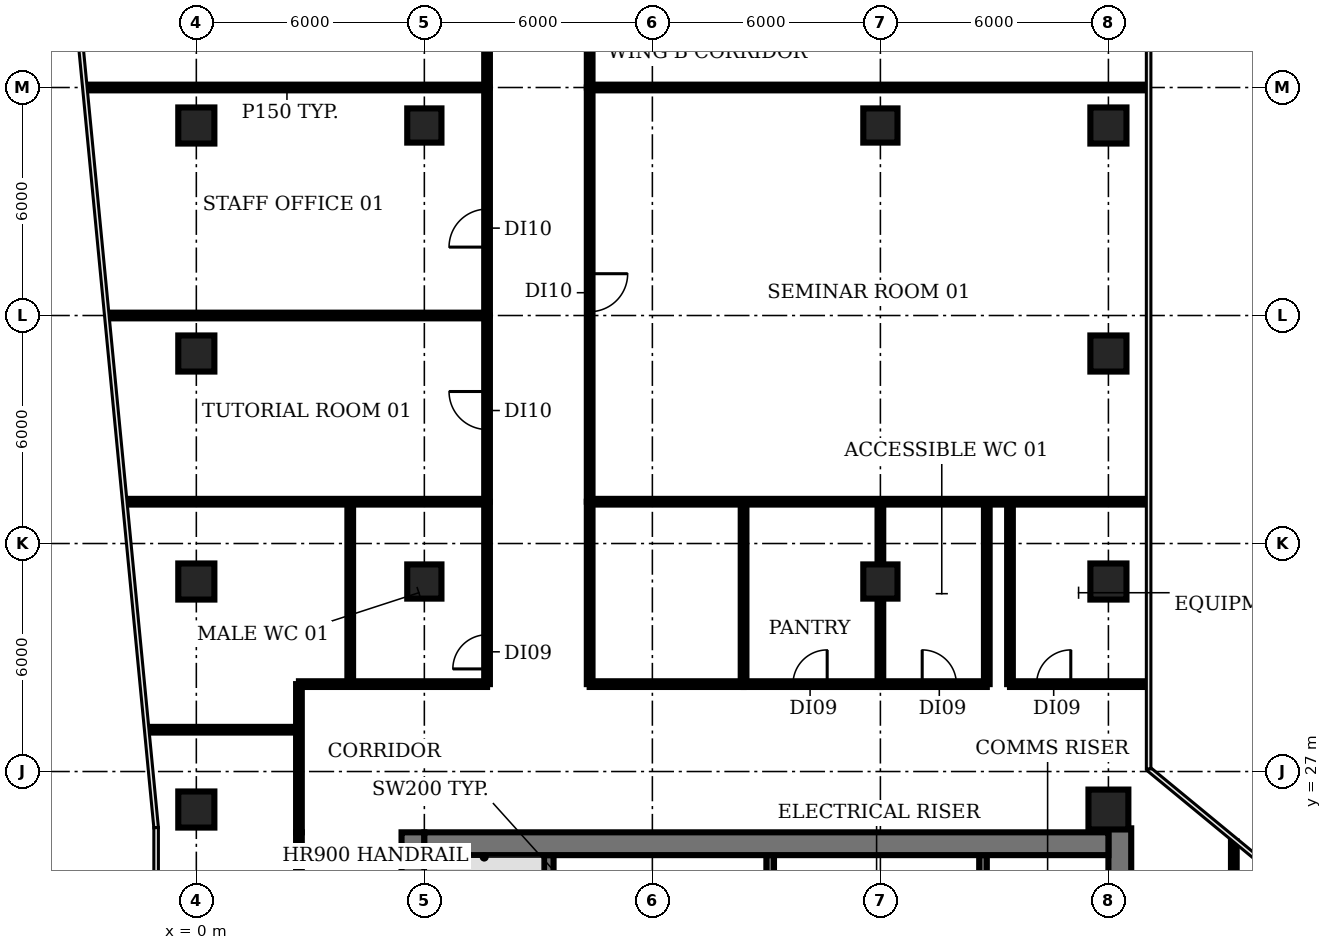
"""IFC4 building model, lengths in metres.
Left out: names, types, materials, properties, quantities, classifications, styles, units other than length and angle.
Written with IfcOpenShell. Run it as: python <this file> out.ifc"""

import sys

from ifc_helpers import new_model, si_unit, direction, frame, frame_2d, origin, origin_2d, place, context, subcontext, project, spatial, rectangle, circle, extrude, element, fill, save


model = new_model("IFC4")
c1 = context("Model", 3, precision=1e-05, world=origin(), true_north=direction((0.0, 1.0)))
c2 = subcontext(c1, "Body", "Model", "MODEL_VIEW")
j1 = project(units=[si_unit("LENGTHUNIT", "METRE"), si_unit("PLANEANGLEUNIT", "RADIAN")], contexts=[c1])
p1 = place(None, origin())
s1 = spatial("IfcSite", under=j1, at=p1, CompositionType="ELEMENT")
p2 = place(p1, origin())
s2 = spatial("IfcBuilding", under=s1, at=p2, CompositionType="ELEMENT")
p3 = place(p2, frame((0.0, 0.0, 192.8)))
s3 = spatial("IfcBuildingStorey", under=s2, at=p3, CompositionType="ELEMENT", Elevation=192.8)
for number, where, z_axis, x_axis in (
    (1, (0.0, 26.0, 0.0), (0.0, 0.0, 1.0), (1.0, 0.0, 0.0)),
    (2, (0.0, 32.0, 0.0), (0.0, 0.0, 1.0), (1.0, 0.0, 0.0)),
    (3, (0.0, 38.0, 0.0), (0.0, 0.0, 1.0), (1.0, 0.0, 0.0)),
    (4, (0.0, 44.0, 0.0), (0.0, 0.0, 1.0), (1.0, 0.0, 0.0)),
):
    element("IfcColumn", number, at=place(p3, frame(where, z_axis=z_axis, x_axis=x_axis)), inside=s3, PredefinedType="COLUMN", context=c2, shape_type="SweptSolid", body=[
        extrude(rectangle(XDim=0.95, YDim=0.95, at=origin_2d()), origin(), (0.0, 0.0, 1.0), 3.2),
    ])
for number, where, z_axis, x_axis in (
    (5, (6.0, 32.0, 0.0), (0.0, 0.0, 1.0), (1.0, 0.0, 0.0)),
    (6, (6.0, 44.0, 0.0), (0.0, 0.0, 1.0), (1.0, 0.0, 0.0)),
    (7, (18.0, 32.0, 0.0), (0.0, 0.0, 1.0), (1.0, 0.0, 0.0)),
    (8, (18.0, 44.0, 0.0), (0.0, 0.0, 1.0), (1.0, 0.0, 0.0)),
):
    element("IfcColumn", number, at=place(p3, frame(where, z_axis=z_axis, x_axis=x_axis)), inside=s3, PredefinedType="COLUMN", context=c2, shape_type="SweptSolid", body=[
        extrude(rectangle(XDim=0.9, YDim=0.9, at=origin_2d()), origin(), (0.0, 0.0, 1.0), 3.2),
    ])
p4 = place(p3, frame((24.0, 26.0, 0.0), z_axis=(0.0, 0.0, 1.0), x_axis=(1.0, 0.0, 0.0)))
e9 = element("IfcColumn", 9, at=p4, inside=s3, PredefinedType="COLUMN", context=c2, shape_type="SweptSolid", body=[
    extrude(circle(Radius=0.525, at=origin_2d()), origin(), (0.0, 0.0, 1.0), 3.2),
])
for number, where, z_axis, x_axis in (
    (10, (24.0, 32.0, 0.0), (0.0, 0.0, 1.0), (1.0, 0.0, 0.0)),
    (11, (24.0, 38.0, 0.0), (0.0, 0.0, 1.0), (1.0, 0.0, 0.0)),
    (12, (24.0, 44.0, 0.0), (0.0, 0.0, 1.0), (1.0, 0.0, 0.0)),
):
    element("IfcColumn", number, at=place(p3, frame(where, z_axis=z_axis, x_axis=x_axis)), inside=s3, PredefinedType="COLUMN", context=c2, shape_type="SweptSolid", body=[
        extrude(rectangle(XDim=0.95, YDim=0.95, at=origin_2d()), origin(), (0.0, 0.0, 1.0), 3.2),
    ])
p5 = place(p3, frame((9.275, 18.375, 0.0), z_axis=(0.0, 0.0, 1.0), x_axis=(0.0, 1.0, 0.0)))
e13 = element("IfcWall", 13, at=p5, inside=s3, PredefinedType="SHEAR", context=c2, shape_type="SweptSolid", body=[
    extrude(rectangle(XDim=6.425, YDim=0.25, at=frame_2d((3.212, 0.0))), origin(), (0.0, 0.0, 1.0), 3.8),
])
for number, where, z_axis, x_axis in (
    (14, (15.1, 22.9, 0.0), (0.0, 0.0, 1.0), (0.0, 1.0, 0.0)),
    (15, (20.7, 22.9, 0.0), (0.0, 0.0, 1.0), (0.0, 1.0, 0.0)),
):
    element("IfcWall", number, at=place(p3, frame(where, z_axis=z_axis, x_axis=x_axis)), inside=s3, PredefinedType="SHEAR", context=c2, shape_type="SweptSolid", body=[
        extrude(rectangle(XDim=1.9, YDim=0.2, at=frame_2d((0.95, 0.0))), origin(), (0.0, 0.0, 1.0), 3.8),
    ])
p6 = place(p3, frame((5.7, 4.8, 0.0), z_axis=(0.0, 0.0, 1.0), x_axis=(0.0, 1.0, 0.0)))
e16 = element("IfcWall", 16, at=p6, inside=s3, PredefinedType="SHEAR", context=c2, shape_type="SweptSolid", body=[
    extrude(rectangle(XDim=20.6, YDim=0.6, at=frame_2d((10.3, 0.0))), origin(), (0.0, 0.0, 1.0), 3.8),
])
p7 = place(p6, frame((0.85, 0.0, 0.0)))
e17 = element("IfcOpeningElement", 17, at=p7, cuts=e16, PredefinedType="OPENING", context=c2, shape_type="SweptSolid", body=[
    extrude(rectangle(XDim=1.5, YDim=2.1, at=frame_2d((0.75, 1.05))), frame((0.0, 0.31, 0.0), z_axis=(0.0, -1.0, 0.0), x_axis=(1.0, 0.0, 0.0)), (0.0, 0.0, 1.0), 0.62),
])
p8 = place(p6, frame((7.3, 0.0, 0.0)))
e18 = element("IfcOpeningElement", 18, at=p8, cuts=e16, PredefinedType="OPENING", context=c2, shape_type="SweptSolid", body=[
    extrude(rectangle(XDim=1.2, YDim=2.1, at=frame_2d((0.6, 1.05))), frame((0.0, 0.31, 0.0), z_axis=(0.0, -1.0, 0.0), x_axis=(1.0, 0.0, 0.0)), (0.0, 0.0, 1.0), 0.62),
])
p9 = place(p6, frame((13.85, 0.0, 0.0)))
e19 = element("IfcOpeningElement", 19, at=p9, cuts=e16, PredefinedType="OPENING", context=c2, shape_type="SweptSolid", body=[
    extrude(rectangle(XDim=1.2, YDim=2.1, at=frame_2d((0.6, 1.05))), frame((0.0, 0.31, 0.0), z_axis=(0.0, -1.0, 0.0), x_axis=(1.0, 0.0, 0.0)), (0.0, 0.0, 1.0), 0.62),
])
p10 = place(p3, frame((24.3, 25.505, 0.0), z_axis=(0.0, 0.0, 1.0), x_axis=(0.0, -1.0, 0.0)))
e20 = element("IfcWall", 20, at=p10, inside=s3, PredefinedType="SHEAR", context=c2, shape_type="SweptSolid", body=[
    extrude(rectangle(XDim=20.705, YDim=0.6, at=frame_2d((10.353, 0.0))), origin(), (0.0, 0.0, 1.0), 3.8),
])
p11 = place(p10, frame((18.355, 0.0, 0.0)))
e21 = element("IfcOpeningElement", 21, at=p11, cuts=e20, PredefinedType="OPENING", context=c2, shape_type="SweptSolid", body=[
    extrude(rectangle(XDim=1.5, YDim=2.1, at=frame_2d((0.75, 1.05))), frame((0.0, 0.31, 0.0), z_axis=(0.0, -1.0, 0.0), x_axis=(1.0, 0.0, 0.0)), (0.0, 0.0, 1.0), 0.62),
])
p12 = place(p10, frame((12.255, 0.0, 0.0)))
e22 = element("IfcOpeningElement", 22, at=p12, cuts=e20, PredefinedType="OPENING", context=c2, shape_type="SweptSolid", body=[
    extrude(rectangle(XDim=0.9, YDim=2.1, at=frame_2d((0.45, 1.05))), frame((0.0, 0.31, 0.0), z_axis=(0.0, -1.0, 0.0), x_axis=(1.0, 0.0, 0.0)), (0.0, 0.0, 1.0), 0.62),
])
p13 = place(p10, frame((6.255, 0.0, 0.0)))
e23 = element("IfcOpeningElement", 23, at=p13, cuts=e20, PredefinedType="OPENING", context=c2, shape_type="SweptSolid", body=[
    extrude(rectangle(XDim=2.0, YDim=2.1, at=frame_2d((1.0, 1.05))), frame((0.0, 0.31, 0.0), z_axis=(0.0, -1.0, 0.0), x_axis=(1.0, 0.0, 0.0)), (0.0, 0.0, 1.0), 0.62),
])
p14 = place(p3, frame((6.0, 25.1, 0.0), z_axis=(0.0, 0.0, 1.0), x_axis=(1.0, 0.0, 0.0)))
e24 = element("IfcWall", 24, at=p14, inside=s3, PredefinedType="SHEAR", context=c2, shape_type="SweptSolid", body=[
    extrude(rectangle(XDim=18.0, YDim=0.6, at=frame_2d((9.0, 0.0))), origin(), (0.0, 0.0, 1.0), 3.8),
])
p15 = place(p3, frame((-2.88, 45.0, 0.0), z_axis=(0.0, 0.0, 1.0), x_axis=(1.0, 0.0, 0.0)))
e25 = element("IfcWall", 25, at=p15, inside=s3, PredefinedType="PARTITIONING", context=c2, shape_type="SweptSolid", body=[
    extrude(rectangle(XDim=10.53, YDim=0.15, at=frame_2d((5.265, 0.0))), origin(), (0.0, 0.0, 1.0), 2.83),
])
p16 = place(p3, frame((-2.31, 39.0, 0.0), z_axis=(0.0, 0.0, 1.0), x_axis=(1.0, 0.0, 0.0)))
e26 = element("IfcWall", 26, at=p16, inside=s3, PredefinedType="PARTITIONING", context=c2, shape_type="SweptSolid", body=[
    extrude(rectangle(XDim=9.96, YDim=0.15, at=frame_2d((4.98, 0.0))), origin(), (0.0, 0.0, 1.0), 2.83),
])
p17 = place(p3, frame((-1.83, 34.1, 0.0), z_axis=(0.0, 0.0, 1.0), x_axis=(1.0, 0.0, 0.0)))
e27 = element("IfcWall", 27, at=p17, inside=s3, PredefinedType="PARTITIONING", context=c2, shape_type="SweptSolid", body=[
    extrude(rectangle(XDim=9.48, YDim=0.15, at=frame_2d((4.74, 0.0))), origin(), (0.0, 0.0, 1.0), 2.83),
])
p18 = place(p3, frame((-1.26, 28.1, 0.0), z_axis=(0.0, 0.0, 1.0), x_axis=(1.0, 0.0, 0.0)))
e28 = element("IfcWall", 28, at=p18, inside=s3, PredefinedType="PARTITIONING", context=c2, shape_type="SweptSolid", body=[
    extrude(rectangle(XDim=3.96, YDim=0.15, at=frame_2d((1.98, 0.0))), origin(), (0.0, 0.0, 1.0), 2.83),
])
p19 = place(p3, frame((2.7, 4.8, 0.0), z_axis=(0.0, 0.0, 1.0), x_axis=(0.0, 1.0, 0.0)))
e29 = element("IfcWall", 29, at=p19, inside=s3, PredefinedType="PARTITIONING", context=c2, shape_type="SweptSolid", body=[
    extrude(rectangle(XDim=20.6, YDim=0.15, at=frame_2d((10.3, 0.0))), origin(), (0.0, 0.0, 1.0), 2.83),
])
p20 = place(p19, frame((10.2, 0.0, 0.0)))
e30 = element("IfcOpeningElement", 30, at=p20, cuts=e29, PredefinedType="OPENING", context=c2, shape_type="SweptSolid", body=[
    extrude(rectangle(XDim=1.2, YDim=2.1, at=frame_2d((0.6, 1.05))), frame((0.0, 0.085, 0.0), z_axis=(0.0, -1.0, 0.0), x_axis=(1.0, 0.0, 0.0)), (0.0, 0.0, 1.0), 0.17),
])
p21 = place(p3, frame((2.7, 25.4, 0.0), z_axis=(0.0, 0.0, 1.0), x_axis=(0.0, 1.0, 0.0)))
e31 = element("IfcWall", 31, at=p21, inside=s3, PredefinedType="PARTITIONING", context=c2, shape_type="SweptSolid", body=[
    extrude(rectangle(XDim=3.9, YDim=0.15, at=frame_2d((1.95, 0.0))), origin(), (0.0, 0.0, 1.0), 2.83),
])
p22 = place(p3, frame((2.7, 29.3, 0.0), z_axis=(0.0, 0.0, 1.0), x_axis=(1.0, 0.0, 0.0)))
e32 = element("IfcWall", 32, at=p22, inside=s3, PredefinedType="PARTITIONING", context=c2, shape_type="SweptSolid", body=[
    extrude(rectangle(XDim=4.95, YDim=0.15, at=frame_2d((2.475, 0.0))), origin(), (0.0, 0.0, 1.0), 2.83),
])
p23 = place(p3, frame((4.05, 29.3, 0.0), z_axis=(0.0, 0.0, 1.0), x_axis=(0.0, 1.0, 0.0)))
e33 = element("IfcWall", 33, at=p23, inside=s3, PredefinedType="PARTITIONING", context=c2, shape_type="SweptSolid", body=[
    extrude(rectangle(XDim=4.8, YDim=0.15, at=frame_2d((2.4, 0.0))), origin(), (0.0, 0.0, 1.0), 2.83),
])
p24 = place(p3, frame((7.65, 29.3, 0.0), z_axis=(0.0, 0.0, 1.0), x_axis=(0.0, 1.0, 0.0)))
e34 = element("IfcWall", 34, at=p24, inside=s3, PredefinedType="PARTITIONING", context=c2, shape_type="SweptSolid", body=[
    extrude(rectangle(XDim=4.8, YDim=0.15, at=frame_2d((2.4, 0.0))), origin(), (0.0, 0.0, 1.0), 2.83),
])
p25 = place(p24, frame((0.4, 0.0, 0.0)))
e35 = element("IfcOpeningElement", 35, at=p25, cuts=e34, PredefinedType="OPENING", context=c2, shape_type="SweptSolid", body=[
    extrude(rectangle(XDim=0.9, YDim=2.1, at=frame_2d((0.45, 1.05))), frame((0.0, 0.085, 0.0), z_axis=(0.0, -1.0, 0.0), x_axis=(1.0, 0.0, 0.0)), (0.0, 0.0, 1.0), 0.17),
])
p26 = place(p3, frame((7.65, 34.1, 0.0), z_axis=(0.0, 0.0, 1.0), x_axis=(0.0, 1.0, 0.0)))
e36 = element("IfcWall", 36, at=p26, inside=s3, PredefinedType="PARTITIONING", context=c2, shape_type="SweptSolid", body=[
    extrude(rectangle(XDim=4.9, YDim=0.15, at=frame_2d((2.45, 0.0))), origin(), (0.0, 0.0, 1.0), 2.83),
])
p27 = place(p26, frame((1.9, 0.0, 0.0)))
e37 = element("IfcOpeningElement", 37, at=p27, cuts=e36, PredefinedType="OPENING", context=c2, shape_type="SweptSolid", body=[
    extrude(rectangle(XDim=1.0, YDim=2.1, at=frame_2d((0.5, 1.05))), frame((0.0, 0.085, 0.0), z_axis=(0.0, -1.0, 0.0), x_axis=(1.0, 0.0, 0.0)), (0.0, 0.0, 1.0), 0.17),
])
p28 = place(p3, frame((7.65, 39.0, 0.0), z_axis=(0.0, 0.0, 1.0), x_axis=(0.0, 1.0, 0.0)))
e38 = element("IfcWall", 38, at=p28, inside=s3, PredefinedType="PARTITIONING", context=c2, shape_type="SweptSolid", body=[
    extrude(rectangle(XDim=6.0, YDim=0.15, at=frame_2d((3.0, 0.0))), origin(), (0.0, 0.0, 1.0), 2.83),
])
p29 = place(p28, frame((1.8, 0.0, 0.0)))
e39 = element("IfcOpeningElement", 39, at=p29, cuts=e38, PredefinedType="OPENING", context=c2, shape_type="SweptSolid", body=[
    extrude(rectangle(XDim=1.0, YDim=2.1, at=frame_2d((0.5, 1.05))), frame((0.0, 0.085, 0.0), z_axis=(0.0, -1.0, 0.0), x_axis=(1.0, 0.0, 0.0)), (0.0, 0.0, 1.0), 0.17),
])
p30 = place(p3, frame((7.65, 45.0, 0.0), z_axis=(0.0, 0.0, 1.0), x_axis=(0.0, 1.0, 0.0)))
e40 = element("IfcWall", 40, at=p30, inside=s3, PredefinedType="PARTITIONING", context=c2, shape_type="SweptSolid", body=[
    extrude(rectangle(XDim=18.118, YDim=0.15, at=frame_2d((9.059, 0.0))), origin(), (0.0, 0.0, 1.0), 2.83),
])
p31 = place(p30, frame((7.61, 0.0, 0.0)))
e41 = element("IfcOpeningElement", 41, at=p31, cuts=e40, PredefinedType="OPENING", context=c2, shape_type="SweptSolid", body=[
    extrude(rectangle(XDim=1.2, YDim=2.1, at=frame_2d((0.6, 1.05))), frame((0.0, 0.085, 0.0), z_axis=(0.0, -1.0, 0.0), x_axis=(1.0, 0.0, 0.0)), (0.0, 0.0, 1.0), 0.17),
])
p32 = place(p3, frame((10.35, 29.3, 0.0), z_axis=(0.0, 0.0, 1.0), x_axis=(0.0, 1.0, 0.0)))
e42 = element("IfcWall", 42, at=p32, inside=s3, PredefinedType="PARTITIONING", context=c2, shape_type="SweptSolid", body=[
    extrude(rectangle(XDim=4.8, YDim=0.15, at=frame_2d((2.4, 0.0))), origin(), (0.0, 0.0, 1.0), 2.83),
])
p33 = place(p3, frame((10.35, 29.3, 0.0), z_axis=(0.0, 0.0, 1.0), x_axis=(1.0, 0.0, 0.0)))
e43 = element("IfcWall", 43, at=p33, inside=s3, PredefinedType="PARTITIONING", context=c2, shape_type="SweptSolid", body=[
    extrude(rectangle(XDim=4.05, YDim=0.15, at=frame_2d((2.025, 0.0))), origin(), (0.0, 0.0, 1.0), 2.83),
])
p34 = place(p3, frame((10.35, 34.1, 0.0), z_axis=(0.0, 0.0, 1.0), x_axis=(1.0, 0.0, 0.0)))
e44 = element("IfcWall", 44, at=p34, inside=s3, PredefinedType="PARTITIONING", context=c2, shape_type="SweptSolid", body=[
    extrude(rectangle(XDim=14.66, YDim=0.15, at=frame_2d((7.33, 0.0))), origin(), (0.0, 0.0, 1.0), 2.83),
])
p35 = place(p3, frame((10.35, 45.0, 0.0), z_axis=(0.0, 0.0, 1.0), x_axis=(0.0, -1.0, 0.0)))
e45 = element("IfcWall", 45, at=p35, inside=s3, PredefinedType="PARTITIONING", context=c2, shape_type="SweptSolid", body=[
    extrude(rectangle(XDim=10.9, YDim=0.15, at=frame_2d((5.45, 0.0))), origin(), (0.0, 0.0, 1.0), 2.83),
])
p36 = place(p35, frame((4.9, 0.0, 0.0)))
e46 = element("IfcOpeningElement", 46, at=p36, cuts=e45, PredefinedType="OPENING", context=c2, shape_type="SweptSolid", body=[
    extrude(rectangle(XDim=1.0, YDim=2.1, at=frame_2d((0.5, 1.05))), frame((0.0, 0.085, 0.0), z_axis=(0.0, -1.0, 0.0), x_axis=(1.0, 0.0, 0.0)), (0.0, 0.0, 1.0), 0.17),
])
p37 = place(p3, frame((10.35, 45.0, 0.0), z_axis=(0.0, 0.0, 1.0), x_axis=(1.0, 0.0, 0.0)))
e47 = element("IfcWall", 47, at=p37, inside=s3, PredefinedType="PARTITIONING", context=c2, shape_type="SweptSolid", body=[
    extrude(rectangle(XDim=14.643, YDim=0.15, at=frame_2d((7.321, 0.0))), origin(), (0.0, 0.0, 1.0), 2.83),
])
p38 = place(p3, frame((10.35, 51.0, 0.0), z_axis=(0.0, 0.0, 1.0), x_axis=(0.0, -1.0, 0.0)))
e48 = element("IfcWall", 48, at=p38, inside=s3, PredefinedType="PARTITIONING", context=c2, shape_type="SweptSolid", body=[
    extrude(rectangle(XDim=6.0, YDim=0.15, at=frame_2d((3.0, 0.0))), origin(), (0.0, 0.0, 1.0), 2.83),
])
p39 = place(p38, frame((2.4, 0.0, 0.0)))
e49 = element("IfcOpeningElement", 49, at=p39, cuts=e48, PredefinedType="OPENING", context=c2, shape_type="SweptSolid", body=[
    extrude(rectangle(XDim=1.0, YDim=2.1, at=frame_2d((0.5, 1.05))), frame((0.0, 0.085, 0.0), z_axis=(0.0, -1.0, 0.0), x_axis=(1.0, 0.0, 0.0)), (0.0, 0.0, 1.0), 0.17),
])
p40 = place(p3, frame((14.4, 29.3, 0.0), z_axis=(0.0, 0.0, 1.0), x_axis=(0.0, 1.0, 0.0)))
e50 = element("IfcWall", 50, at=p40, inside=s3, PredefinedType="PARTITIONING", context=c2, shape_type="SweptSolid", body=[
    extrude(rectangle(XDim=4.8, YDim=0.15, at=frame_2d((2.4, 0.0))), origin(), (0.0, 0.0, 1.0), 2.83),
])
p41 = place(p3, frame((14.4, 29.3, 0.0), z_axis=(0.0, 0.0, 1.0), x_axis=(1.0, 0.0, 0.0)))
e51 = element("IfcWall", 51, at=p41, inside=s3, PredefinedType="PARTITIONING", context=c2, shape_type="SweptSolid", body=[
    extrude(rectangle(XDim=3.6, YDim=0.15, at=frame_2d((1.8, 0.0))), origin(), (0.0, 0.0, 1.0), 2.83),
])
p42 = place(p41, frame((1.3, 0.0, 0.0)))
e52 = element("IfcOpeningElement", 52, at=p42, cuts=e51, PredefinedType="OPENING", context=c2, shape_type="SweptSolid", body=[
    extrude(rectangle(XDim=0.9, YDim=2.1, at=frame_2d((0.45, 1.05))), frame((0.0, 0.085, 0.0), z_axis=(0.0, -1.0, 0.0), x_axis=(1.0, 0.0, 0.0)), (0.0, 0.0, 1.0), 0.17),
])
p43 = place(p3, frame((18.0, 29.3, 0.0), z_axis=(0.0, 0.0, 1.0), x_axis=(0.0, 1.0, 0.0)))
e53 = element("IfcWall", 53, at=p43, inside=s3, PredefinedType="PARTITIONING", context=c2, shape_type="SweptSolid", body=[
    extrude(rectangle(XDim=4.8, YDim=0.15, at=frame_2d((2.4, 0.0))), origin(), (0.0, 0.0, 1.0), 2.83),
])
p44 = place(p3, frame((18.0, 29.3, 0.0), z_axis=(0.0, 0.0, 1.0), x_axis=(1.0, 0.0, 0.0)))
e54 = element("IfcWall", 54, at=p44, inside=s3, PredefinedType="PARTITIONING", context=c2, shape_type="SweptSolid", body=[
    extrude(rectangle(XDim=2.8, YDim=0.15, at=frame_2d((1.4, 0.0))), origin(), (0.0, 0.0, 1.0), 2.83),
])
p45 = place(p44, frame((1.1, 0.0, 0.0)))
e55 = element("IfcOpeningElement", 55, at=p45, cuts=e54, PredefinedType="OPENING", context=c2, shape_type="SweptSolid", body=[
    extrude(rectangle(XDim=0.9, YDim=2.1, at=frame_2d((0.45, 1.05))), frame((0.0, 0.085, 0.0), z_axis=(0.0, -1.0, 0.0), x_axis=(1.0, 0.0, 0.0)), (0.0, 0.0, 1.0), 0.17),
])
for number, where, z_axis, x_axis in (
    (56, (20.8, 29.3, 0.0), (0.0, 0.0, 1.0), (0.0, 1.0, 0.0)),
    (57, (21.41, 29.3, 0.0), (0.0, 0.0, 1.0), (0.0, 1.0, 0.0)),
):
    element("IfcWall", number, at=place(p3, frame(where, z_axis=z_axis, x_axis=x_axis)), inside=s3, PredefinedType="PARTITIONING", context=c2, shape_type="SweptSolid", body=[
        extrude(rectangle(XDim=4.8, YDim=0.15, at=frame_2d((2.4, 0.0))), origin(), (0.0, 0.0, 1.0), 2.83),
    ])
p46 = place(p3, frame((21.41, 29.3, 0.0), z_axis=(0.0, 0.0, 1.0), x_axis=(1.0, 0.0, 0.0)))
e58 = element("IfcWall", 58, at=p46, inside=s3, PredefinedType="PARTITIONING", context=c2, shape_type="SweptSolid", body=[
    extrude(rectangle(XDim=3.6, YDim=0.15, at=frame_2d((1.8, 0.0))), origin(), (0.0, 0.0, 1.0), 2.83),
])
p47 = place(p46, frame((0.7, 0.0, 0.0)))
e59 = element("IfcOpeningElement", 59, at=p47, cuts=e58, PredefinedType="OPENING", context=c2, shape_type="SweptSolid", body=[
    extrude(rectangle(XDim=0.9, YDim=2.1, at=frame_2d((0.45, 1.05))), frame((0.0, 0.085, 0.0), z_axis=(0.0, -1.0, 0.0), x_axis=(1.0, 0.0, 0.0)), (0.0, 0.0, 1.0), 0.17),
])
p48 = place(p3, frame((27.3, 17.5, 0.0), z_axis=(0.0, 0.0, 1.0), x_axis=(0.0, 1.0, 0.0)))
e60 = element("IfcWall", 60, at=p48, inside=s3, PredefinedType="PARTITIONING", context=c2, shape_type="SweptSolid", body=[
    extrude(rectangle(XDim=7.66, YDim=0.15, at=frame_2d((3.83, 0.0))), origin(), (0.0, 0.0, 1.0), 2.83),
])
p49 = place(p25, origin())
e61 = element("IfcDoor", 61, at=p49, inside=s3, OperationType="SINGLE_SWING_LEFT", PredefinedType="DOOR", context=c2, shape_type="SweptSolid", body=[
    extrude(rectangle(XDim=0.9, YDim=2.1, at=frame_2d((0.45, 1.05))), frame((0.0, 0.025, 0.0), z_axis=(0.0, -1.0, 0.0), x_axis=(1.0, 0.0, 0.0)), (0.0, 0.0, 1.0), 0.05),
])
fill(e35, e61)
p50 = place(p27, origin())
e62 = element("IfcDoor", 62, at=p50, inside=s3, OperationType="SINGLE_SWING_RIGHT", PredefinedType="DOOR", context=c2, shape_type="SweptSolid", body=[
    extrude(rectangle(XDim=1.0, YDim=2.1, at=frame_2d((0.5, 1.05))), frame((0.0, 0.025, 0.0), z_axis=(0.0, -1.0, 0.0), x_axis=(1.0, 0.0, 0.0)), (0.0, 0.0, 1.0), 0.05),
])
fill(e37, e62)
p51 = place(p29, origin())
e63 = element("IfcDoor", 63, at=p51, inside=s3, OperationType="SINGLE_SWING_LEFT", PredefinedType="DOOR", context=c2, shape_type="SweptSolid", body=[
    extrude(rectangle(XDim=1.0, YDim=2.1, at=frame_2d((0.5, 1.05))), frame((0.0, 0.025, 0.0), z_axis=(0.0, -1.0, 0.0), x_axis=(1.0, 0.0, 0.0)), (0.0, 0.0, 1.0), 0.05),
])
fill(e39, e63)
p52 = place(p36, origin())
e64 = element("IfcDoor", 64, at=p52, inside=s3, OperationType="SINGLE_SWING_LEFT", PredefinedType="DOOR", context=c2, shape_type="SweptSolid", body=[
    extrude(rectangle(XDim=1.0, YDim=2.1, at=frame_2d((0.5, 1.05))), frame((0.0, 0.025, 0.0), z_axis=(0.0, -1.0, 0.0), x_axis=(1.0, 0.0, 0.0)), (0.0, 0.0, 1.0), 0.05),
])
fill(e46, e64)
p53 = place(p42, origin())
e65 = element("IfcDoor", 65, at=p53, inside=s3, OperationType="SINGLE_SWING_RIGHT", PredefinedType="DOOR", context=c2, shape_type="SweptSolid", body=[
    extrude(rectangle(XDim=0.9, YDim=2.1, at=frame_2d((0.45, 1.05))), frame((0.0, 0.025, 0.0), z_axis=(0.0, -1.0, 0.0), x_axis=(1.0, 0.0, 0.0)), (0.0, 0.0, 1.0), 0.05),
])
fill(e52, e65)
p54 = place(p45, origin())
e66 = element("IfcDoor", 66, at=p54, inside=s3, OperationType="SINGLE_SWING_LEFT", PredefinedType="DOOR", context=c2, shape_type="SweptSolid", body=[
    extrude(rectangle(XDim=0.9, YDim=2.1, at=frame_2d((0.45, 1.05))), frame((0.0, 0.025, 0.0), z_axis=(0.0, -1.0, 0.0), x_axis=(1.0, 0.0, 0.0)), (0.0, 0.0, 1.0), 0.05),
])
fill(e55, e66)
p55 = place(p47, origin())
e67 = element("IfcDoor", 67, at=p55, inside=s3, OperationType="SINGLE_SWING_RIGHT", PredefinedType="DOOR", context=c2, shape_type="SweptSolid", body=[
    extrude(rectangle(XDim=0.9, YDim=2.1, at=frame_2d((0.45, 1.05))), frame((0.0, 0.025, 0.0), z_axis=(0.0, -1.0, 0.0), x_axis=(1.0, 0.0, 0.0)), (0.0, 0.0, 1.0), 0.05),
])
fill(e59, e67)
save(model, sys.argv[1])
